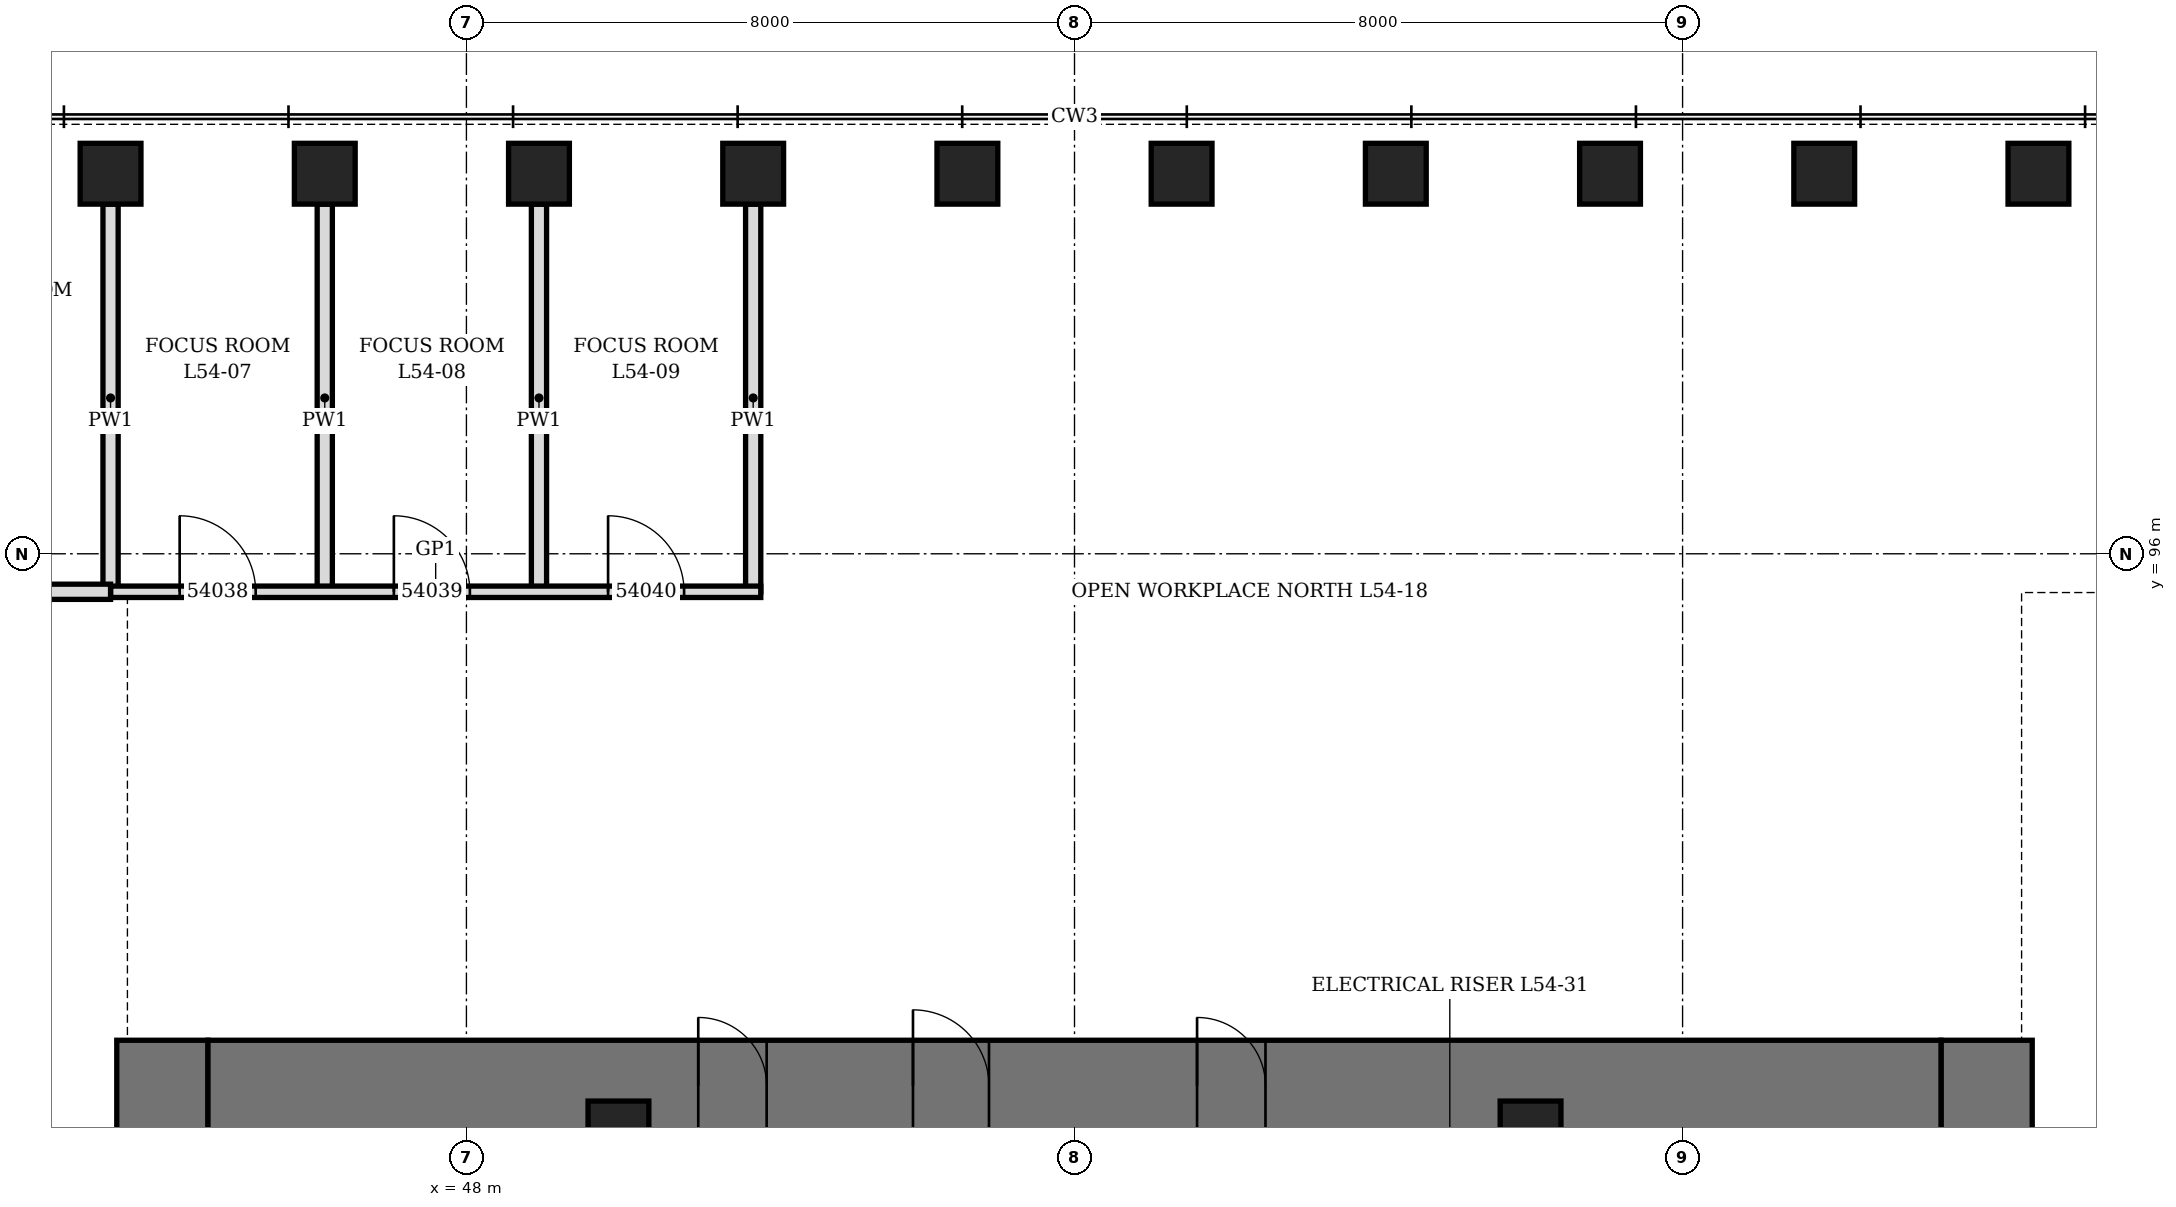
"""IFC4 building model, lengths in metres.
Left out: names, types, materials, properties, quantities, classifications, styles, units other than length and angle.
Written with IfcOpenShell. Run it as: python <this file> out.ifc"""

import sys

from ifc_helpers import new_model, si_unit, direction, frame, frame_2d, origin, origin_2d, place, context, subcontext, project, spatial, rectangle, hollow_rectangle, extrude, element, fill, save


model = new_model("IFC4")
c1 = context("Model", 3, precision=1e-05, world=origin(), true_north=direction((0.0, 1.0)))
c2 = subcontext(c1, "Body", "Model", "MODEL_VIEW")
j1 = project(units=[si_unit("LENGTHUNIT", "METRE"), si_unit("PLANEANGLEUNIT", "RADIAN")], contexts=[c1])
p1 = place(None, origin())
s1 = spatial("IfcSite", under=j1, at=p1, CompositionType="ELEMENT")
p2 = place(p1, origin())
s2 = spatial("IfcBuilding", under=s1, at=p2, CompositionType="ELEMENT")
p3 = place(p2, frame((0.0, 0.0, 240.1)))
s3 = spatial("IfcBuildingStorey", under=s2, at=p3, CompositionType="ELEMENT", Elevation=240.1)
for number, where, z_axis, x_axis in (
    (1, (68.682, 101.0, 0.0), (0.0, 0.0, 1.0), (1.0, 0.0, 0.0)),
    (2, (65.864, 101.0, 0.0), (0.0, 0.0, 1.0), (1.0, 0.0, 0.0)),
    (3, (63.045, 101.0, 0.0), (0.0, 0.0, 1.0), (1.0, 0.0, 0.0)),
    (4, (60.227, 101.0, 0.0), (0.0, 0.0, 1.0), (1.0, 0.0, 0.0)),
    (5, (57.409, 101.0, 0.0), (0.0, 0.0, 1.0), (1.0, 0.0, 0.0)),
    (6, (54.591, 101.0, 0.0), (0.0, 0.0, 1.0), (1.0, 0.0, 0.0)),
    (7, (51.773, 101.0, 0.0), (0.0, 0.0, 1.0), (1.0, 0.0, 0.0)),
    (8, (48.955, 101.0, 0.0), (0.0, 0.0, 1.0), (1.0, 0.0, 0.0)),
    (9, (46.136, 101.0, 0.0), (0.0, 0.0, 1.0), (1.0, 0.0, 0.0)),
    (10, (43.318, 101.0, 0.0), (0.0, 0.0, 1.0), (1.0, 0.0, 0.0)),
):
    element("IfcColumn", number, at=place(p3, frame(where, z_axis=z_axis, x_axis=x_axis)), inside=s3, PredefinedType="COLUMN", context=c2, shape_type="SweptSolid", body=[
        extrude(hollow_rectangle(XDim=0.8, YDim=0.8, WallThickness=0.08, at=origin_2d()), origin(), (0.0, 0.0, 1.0), 4.2),
    ])
p4 = place(p3, frame((44.0, 70.4, 0.0), z_axis=(0.0, 0.0, 1.0), x_axis=(0.0, 1.0, 0.0)))
e11 = element("IfcWall", 11, at=p4, inside=s3, PredefinedType="SHEAR", context=c2, shape_type="SweptSolid", body=[
    extrude(rectangle(XDim=19.2, YDim=1.2, at=frame_2d((9.6, 0.0))), origin(), (0.0, 0.0, 1.0), 4.2),
])
p5 = place(p4, frame((8.6, 0.0, 0.0)))
e12 = element("IfcOpeningElement", 12, at=p5, cuts=e11, PredefinedType="OPENING", context=c2, shape_type="SweptSolid", body=[
    extrude(rectangle(XDim=2.0, YDim=2.4, at=frame_2d((1.0, 1.2))), frame((0.0, 0.61, 0.0), z_axis=(0.0, -1.0, 0.0), x_axis=(1.0, 0.0, 0.0)), (0.0, 0.0, 1.0), 1.22),
])
p6 = place(p3, frame((68.0, 70.4, 0.0), z_axis=(0.0, 0.0, 1.0), x_axis=(0.0, 1.0, 0.0)))
e13 = element("IfcWall", 13, at=p6, inside=s3, PredefinedType="SHEAR", context=c2, shape_type="SweptSolid", body=[
    extrude(rectangle(XDim=19.2, YDim=1.2, at=frame_2d((9.6, 0.0))), origin(), (0.0, 0.0, 1.0), 4.2),
])
p7 = place(p6, frame((8.6, 0.0, 0.0)))
e14 = element("IfcOpeningElement", 14, at=p7, cuts=e13, PredefinedType="OPENING", context=c2, shape_type="SweptSolid", body=[
    extrude(rectangle(XDim=2.0, YDim=2.4, at=frame_2d((1.0, 1.2))), frame((0.0, 0.61, 0.0), z_axis=(0.0, -1.0, 0.0), x_axis=(1.0, 0.0, 0.0)), (0.0, 0.0, 1.0), 1.22),
])
p8 = place(p3, frame((44.6, 89.0, 0.0), z_axis=(0.0, 0.0, 1.0), x_axis=(1.0, 0.0, 0.0)))
e15 = element("IfcWall", 15, at=p8, inside=s3, PredefinedType="SHEAR", context=c2, shape_type="SweptSolid", body=[
    extrude(rectangle(XDim=22.8, YDim=1.2, at=frame_2d((11.4, 0.0))), origin(), (0.0, 0.0, 1.0), 4.2),
])
p9 = place(p8, frame((9.275, 0.0, 0.0)))
e16 = element("IfcOpeningElement", 16, at=p9, cuts=e15, PredefinedType="OPENING", context=c2, shape_type="SweptSolid", body=[
    extrude(rectangle(XDim=1.0, YDim=2.1, at=frame_2d((0.5, 1.05))), frame((0.0, 0.61, 0.0), z_axis=(0.0, -1.0, 0.0), x_axis=(1.0, 0.0, 0.0)), (0.0, 0.0, 1.0), 1.22),
])
p10 = place(p8, frame((6.45, 0.0, 0.0)))
e17 = element("IfcOpeningElement", 17, at=p10, cuts=e15, PredefinedType="OPENING", context=c2, shape_type="SweptSolid", body=[
    extrude(rectangle(XDim=0.9, YDim=2.1, at=frame_2d((0.45, 1.05))), frame((0.0, 0.61, 0.0), z_axis=(0.0, -1.0, 0.0), x_axis=(1.0, 0.0, 0.0)), (0.0, 0.0, 1.0), 1.22),
])
p11 = place(p8, frame((13.012, 0.0, 0.0)))
e18 = element("IfcOpeningElement", 18, at=p11, cuts=e15, PredefinedType="OPENING", context=c2, shape_type="SweptSolid", body=[
    extrude(rectangle(XDim=0.9, YDim=2.1, at=frame_2d((0.45, 1.05))), frame((0.0, 0.61, 0.0), z_axis=(0.0, -1.0, 0.0), x_axis=(1.0, 0.0, 0.0)), (0.0, 0.0, 1.0), 1.22),
])
for number, where, z_axis, x_axis in (
    (19, (50.0, 88.4, 0.0), (0.0, 0.0, 1.0), (1.0, 0.0, 0.0)),
    (20, (62.0, 88.4, 0.0), (0.0, 0.0, 1.0), (1.0, 0.0, 0.0)),
):
    element("IfcColumn", number, at=place(p3, frame(where, z_axis=z_axis, x_axis=x_axis)), inside=s3, PredefinedType="COLUMN", context=c2, shape_type="SweptSolid", body=[
        extrude(hollow_rectangle(XDim=0.8, YDim=0.8, WallThickness=0.1, at=origin_2d()), origin(), (0.0, 0.0, 1.0), 4.2),
    ])
for number, where, z_axis, x_axis in (
    (21, (43.318, 95.5, 0.0), (0.0, 0.0, 1.0), (0.0, 1.0, 0.0)),
    (22, (46.136, 95.5, 0.0), (0.0, 0.0, 1.0), (0.0, 1.0, 0.0)),
    (23, (48.955, 95.5, 0.0), (0.0, 0.0, 1.0), (0.0, 1.0, 0.0)),
    (24, (51.773, 95.5, 0.0), (0.0, 0.0, 1.0), (0.0, 1.0, 0.0)),
):
    element("IfcWall", number, at=place(p3, frame(where, z_axis=z_axis, x_axis=x_axis)), inside=s3, PredefinedType="PARTITIONING", context=c2, shape_type="SweptSolid", body=[
        extrude(rectangle(XDim=5.1, YDim=0.2, at=frame_2d((2.55, 0.0))), origin(), (0.0, 0.0, 1.0), 3.188),
    ])
p12 = place(p3, frame((43.318, 95.5, 0.0), z_axis=(0.0, 0.0, 1.0), x_axis=(1.0, 0.0, 0.0)))
e25 = element("IfcWall", 25, at=p12, inside=s3, PredefinedType="PARTITIONING", context=c2, shape_type="SweptSolid", body=[
    extrude(rectangle(XDim=8.555, YDim=0.15, at=frame_2d((4.277, 0.0))), origin(), (0.0, 0.0, 1.0), 3.95),
])
p13 = place(p12, frame((0.909, 0.0, 0.0)))
e26 = element("IfcOpeningElement", 26, at=p13, cuts=e25, PredefinedType="OPENING", context=c2, shape_type="SweptSolid", body=[
    extrude(rectangle(XDim=1.0, YDim=2.4, at=frame_2d((0.5, 1.2))), frame((0.0, 0.085, 0.0), z_axis=(0.0, -1.0, 0.0), x_axis=(1.0, 0.0, 0.0)), (0.0, 0.0, 1.0), 0.17),
])
p14 = place(p12, frame((3.727, 0.0, 0.0)))
e27 = element("IfcOpeningElement", 27, at=p14, cuts=e25, PredefinedType="OPENING", context=c2, shape_type="SweptSolid", body=[
    extrude(rectangle(XDim=1.0, YDim=2.4, at=frame_2d((0.5, 1.2))), frame((0.0, 0.085, 0.0), z_axis=(0.0, -1.0, 0.0), x_axis=(1.0, 0.0, 0.0)), (0.0, 0.0, 1.0), 0.17),
])
p15 = place(p12, frame((6.545, 0.0, 0.0)))
e28 = element("IfcOpeningElement", 28, at=p15, cuts=e25, PredefinedType="OPENING", context=c2, shape_type="SweptSolid", body=[
    extrude(rectangle(XDim=1.0, YDim=2.4, at=frame_2d((0.5, 1.2))), frame((0.0, 0.085, 0.0), z_axis=(0.0, -1.0, 0.0), x_axis=(1.0, 0.0, 0.0)), (0.0, 0.0, 1.0), 0.17),
])
p16 = place(p3, frame((40.9, 95.5, 0.0), z_axis=(0.0, 0.0, 1.0), x_axis=(1.0, 0.0, 0.0)))
e29 = element("IfcWall", 29, at=p16, inside=s3, PredefinedType="PARTITIONING", context=c2, shape_type="SweptSolid", body=[
    extrude(rectangle(XDim=2.418, YDim=0.2, at=frame_2d((1.209, 0.0))), origin(), (0.0, 0.0, 1.0), 3.95),
])
p17 = place(p16, frame((0.509, 0.0, 0.0)))
e30 = element("IfcOpeningElement", 30, at=p17, cuts=e29, PredefinedType="OPENING", context=c2, shape_type="SweptSolid", body=[
    extrude(rectangle(XDim=1.0, YDim=2.1, at=frame_2d((0.5, 1.05))), frame((0.0, 0.11, 0.0), z_axis=(0.0, -1.0, 0.0), x_axis=(1.0, 0.0, 0.0)), (0.0, 0.0, 1.0), 0.22),
])
p18 = place(p9, origin())
e31 = element("IfcDoor", 31, at=p18, inside=s3, OperationType="SINGLE_SWING_LEFT", PredefinedType="DOOR", context=c2, shape_type="SweptSolid", body=[
    extrude(rectangle(XDim=1.0, YDim=2.1, at=frame_2d((0.5, 1.05))), frame((0.0, 0.35, 0.0), z_axis=(0.0, -1.0, 0.0), x_axis=(1.0, 0.0, 0.0)), (0.0, 0.0, 1.0), 0.7),
])
fill(e16, e31)
p19 = place(p10, origin())
e32 = element("IfcDoor", 32, at=p19, inside=s3, OperationType="SINGLE_SWING_LEFT", PredefinedType="DOOR", context=c2, shape_type="SweptSolid", body=[
    extrude(rectangle(XDim=0.9, YDim=2.1, at=frame_2d((0.45, 1.05))), frame((0.0, 0.35, 0.0), z_axis=(0.0, -1.0, 0.0), x_axis=(1.0, 0.0, 0.0)), (0.0, 0.0, 1.0), 0.7),
])
fill(e17, e32)
p20 = place(p11, origin())
e33 = element("IfcDoor", 33, at=p20, inside=s3, OperationType="SINGLE_SWING_LEFT", PredefinedType="DOOR", context=c2, shape_type="SweptSolid", body=[
    extrude(rectangle(XDim=0.9, YDim=2.1, at=frame_2d((0.45, 1.05))), frame((0.0, 0.35, 0.0), z_axis=(0.0, -1.0, 0.0), x_axis=(1.0, 0.0, 0.0)), (0.0, 0.0, 1.0), 0.7),
])
fill(e18, e33)
p21 = place(p13, origin())
e34 = element("IfcDoor", 34, at=p21, inside=s3, OperationType="SINGLE_SWING_RIGHT", PredefinedType="DOOR", context=c2, shape_type="SweptSolid", body=[
    extrude(rectangle(XDim=1.0, YDim=2.4, at=frame_2d((0.5, 1.2))), frame((0.0, 0.075, 0.0), z_axis=(0.0, -1.0, 0.0), x_axis=(1.0, 0.0, 0.0)), (0.0, 0.0, 1.0), 0.149),
])
fill(e26, e34)
p22 = place(p14, origin())
e35 = element("IfcDoor", 35, at=p22, inside=s3, OperationType="SINGLE_SWING_RIGHT", PredefinedType="DOOR", context=c2, shape_type="SweptSolid", body=[
    extrude(rectangle(XDim=1.0, YDim=2.4, at=frame_2d((0.5, 1.2))), frame((0.0, 0.075, 0.0), z_axis=(0.0, -1.0, 0.0), x_axis=(1.0, 0.0, 0.0)), (0.0, 0.0, 1.0), 0.149),
])
fill(e27, e35)
p23 = place(p15, origin())
e36 = element("IfcDoor", 36, at=p23, inside=s3, OperationType="SINGLE_SWING_RIGHT", PredefinedType="DOOR", context=c2, shape_type="SweptSolid", body=[
    extrude(rectangle(XDim=1.0, YDim=2.4, at=frame_2d((0.5, 1.2))), frame((0.0, 0.075, 0.0), z_axis=(0.0, -1.0, 0.0), x_axis=(1.0, 0.0, 0.0)), (0.0, 0.0, 1.0), 0.149),
])
fill(e28, e36)
save(model, sys.argv[1])
